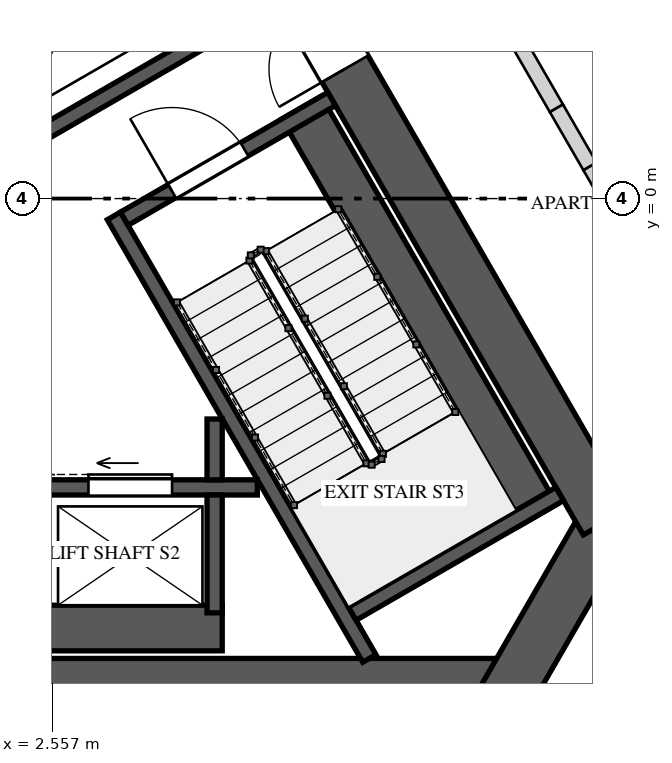
"""IFC4 building model, lengths in metres.
Left out: names, types, materials, properties, quantities, classifications, styles, units other than length and angle.
Written with IfcOpenShell. Run it as: python <this file> out.ifc"""

import sys

from ifc_helpers import new_model, si_unit, direction, frame, frame_2d, origin, place, context, subcontext, project, spatial, rectangle, extrude, element, fill, save


model = new_model("IFC4")
c1 = context("Model", 3, precision=1e-05, world=origin(), true_north=direction((0.0, 1.0)))
c2 = subcontext(c1, "Body", "Model", "MODEL_VIEW")
j1 = project(units=[si_unit("LENGTHUNIT", "METRE"), si_unit("PLANEANGLEUNIT", "RADIAN")], contexts=[c1])
p1 = place(None, origin())
s1 = spatial("IfcSite", under=j1, at=p1, CompositionType="ELEMENT")
p2 = place(p1, origin())
s2 = spatial("IfcBuilding", under=s1, at=p2, CompositionType="ELEMENT")
p3 = place(p2, frame((0.0, 0.0, 245.2)))
s3 = spatial("IfcBuildingStorey", under=s2, at=p3, CompositionType="ELEMENT", Elevation=245.2)
p4 = place(p3, frame((-8.603, -6.4, 0.0), z_axis=(0.0, 0.0, 1.0), x_axis=(1.0, 0.0, 0.0)))
e1 = element("IfcWall", 1, at=p4, inside=s3, PredefinedType="SHEAR", context=c2, shape_type="SweptSolid", body=[
    extrude(rectangle(XDim=17.205, YDim=0.7, at=frame_2d((8.603, 0.0))), origin(), (0.0, 0.0, 1.0), 4.0),
])
p5 = place(p4, frame((6.808, 0.0, 0.0)))
e2 = element("IfcOpeningElement", 2, at=p5, cuts=e1, PredefinedType="OPENING", context=c2, shape_type="SweptSolid", body=[
    extrude(rectangle(XDim=1.0, YDim=2.4, at=frame_2d((0.5, 1.2))), frame((0.0, 0.36, 0.0), z_axis=(0.0, -1.0, 0.0), x_axis=(1.0, 0.0, 0.0)), (0.0, 0.0, 1.0), 0.72),
])
p6 = place(p3, frame((8.501, -6.575, 0.0), z_axis=(0.0, 0.0, 1.0), x_axis=(0.499995765644, 0.866027848477, 0.0)))
e3 = element("IfcWall", 3, at=p6, inside=s3, PredefinedType="SHEAR", context=c2, shape_type="SweptSolid", body=[
    extrude(rectangle(XDim=2.887, YDim=0.7, at=frame_2d((1.443, 0.0))), origin(), (0.0, 0.0, 1.0), 4.0),
])
p7 = place(p3, frame((9.844, -4.25, 0.0), z_axis=(0.0, 0.0, 1.0), x_axis=(-0.500003331888, 0.866023480109, 0.0)))
e4 = element("IfcWall", 4, at=p7, inside=s3, PredefinedType="SHEAR", context=c2, shape_type="SweptSolid", body=[
    extrude(rectangle(XDim=17.205, YDim=0.7, at=frame_2d((8.603, 0.0))), origin(), (0.0, 0.0, 1.0), 4.0),
])
p8 = place(p7, frame((6.877, 0.0, 0.0)))
e5 = element("IfcOpeningElement", 5, at=p8, cuts=e4, PredefinedType="OPENING", context=c2, shape_type="SweptSolid", body=[
    extrude(rectangle(XDim=1.0, YDim=2.4, at=frame_2d((0.5, 1.2))), frame((0.0, 0.36, 0.0), z_axis=(0.0, -1.0, 0.0), x_axis=(1.0, 0.0, 0.0)), (0.0, 0.0, 1.0), 0.72),
])
p9 = place(p3, frame((8.933, -4.172, 0.0), z_axis=(0.0, 0.0, 1.0), x_axis=(-0.500026960575, 0.86600983753, 0.0)))
e6 = element("IfcWall", 6, at=p9, inside=s3, PredefinedType="SOLIDWALL", context=c2, shape_type="SweptSolid", body=[
    extrude(rectangle(XDim=6.2, YDim=0.6, at=frame_2d((3.1, 0.0))), origin(), (0.0, 0.0, 1.0), 3.65),
])
p10 = place(p3, frame((6.726, -6.05, 0.0), z_axis=(0.0, 0.0, 1.0), x_axis=(-0.499970804718, 0.866042259032, 0.0)))
e7 = element("IfcWall", 7, at=p10, inside=s3, PredefinedType="SOLIDWALL", context=c2, shape_type="SweptSolid", body=[
    extrude(rectangle(XDim=6.723, YDim=0.2, at=frame_2d((3.361, 0.0))), origin(), (0.0, 0.0, 1.0), 3.65),
])
p11 = place(p3, frame((6.501, -5.461, 0.0), z_axis=(0.0, 0.0, 1.0), x_axis=(0.866035871367, 0.499981869177, 0.0)))
e8 = element("IfcWall", 8, at=p11, inside=s3, PredefinedType="SOLIDWALL", context=c2, shape_type="SweptSolid", body=[
    extrude(rectangle(XDim=3.15, YDim=0.2, at=frame_2d((1.575, 0.0))), origin(), (0.0, 0.0, 1.0), 3.65),
])
p12 = place(p3, frame((3.501, -0.265, 0.0), z_axis=(0.0, 0.0, 1.0), x_axis=(0.866035871367, 0.499981869177, 0.0)))
e9 = element("IfcWall", 9, at=p12, inside=s3, PredefinedType="SOLIDWALL", context=c2, shape_type="SweptSolid", body=[
    extrude(rectangle(XDim=3.15, YDim=0.2, at=frame_2d((1.575, 0.0))), origin(), (0.0, 0.0, 1.0), 3.65),
])
p13 = place(p12, frame((0.725, 0.0, 0.0)))
e10 = element("IfcOpeningElement", 10, at=p13, cuts=e9, PredefinedType="OPENING", context=c2, shape_type="SweptSolid", body=[
    extrude(rectangle(XDim=1.1, YDim=2.4, at=frame_2d((0.55, 1.2))), frame((0.0, 0.11, 0.0), z_axis=(0.0, -1.0, 0.0), x_axis=(1.0, 0.0, 0.0)), (0.0, 0.0, 1.0), 0.22),
])
p14 = place(p3, frame((-0.71, -3.8, 0.0), z_axis=(0.0, 0.0, 1.0), x_axis=(1.0, 0.0, 0.0)))
e11 = element("IfcWall", 11, at=p14, inside=s3, PredefinedType="SOLIDWALL", context=c2, shape_type="SweptSolid", body=[
    extrude(rectangle(XDim=5.961, YDim=0.2, at=frame_2d((2.981, 0.0))), origin(), (0.0, 0.0, 1.0), 3.65),
])
p15 = place(p14, frame((1.09, 0.0, 0.0)))
e12 = element("IfcOpeningElement", 12, at=p15, cuts=e11, PredefinedType="OPENING", context=c2, shape_type="SweptSolid", body=[
    extrude(rectangle(XDim=1.1, YDim=2.1, at=frame_2d((0.55, 1.05))), frame((0.0, 0.11, 0.0), z_axis=(0.0, -1.0, 0.0), x_axis=(1.0, 0.0, 0.0)), (0.0, 0.0, 1.0), 0.22),
])
p16 = place(p14, frame((3.74, 0.0, 0.0)))
e13 = element("IfcOpeningElement", 13, at=p16, cuts=e11, PredefinedType="OPENING", context=c2, shape_type="SweptSolid", body=[
    extrude(rectangle(XDim=1.1, YDim=2.1, at=frame_2d((0.55, 1.05))), frame((0.0, 0.11, 0.0), z_axis=(0.0, -1.0, 0.0), x_axis=(1.0, 0.0, 0.0)), (0.0, 0.0, 1.0), 0.22),
])
p17 = place(p3, frame((-0.71, -5.65, 0.0), z_axis=(0.0, 0.0, 1.0), x_axis=(1.0, 0.0, 0.0)))
e14 = element("IfcWall", 14, at=p17, inside=s3, PredefinedType="SOLIDWALL", context=c2, shape_type="SweptSolid", body=[
    extrude(rectangle(XDim=5.5, YDim=0.6, at=frame_2d((2.75, 0.0))), origin(), (0.0, 0.0, 1.0), 3.65),
])
p18 = place(p3, frame((4.69, -3.9, 0.0), z_axis=(0.0, 0.0, 1.0), x_axis=(0.0, -1.0, 0.0)))
e15 = element("IfcWall", 15, at=p18, inside=s3, PredefinedType="SOLIDWALL", context=c2, shape_type="SweptSolid", body=[
    extrude(rectangle(XDim=1.55, YDim=0.2, at=frame_2d((0.775, 0.0))), origin(), (0.0, 0.0, 1.0), 3.65),
])
p19 = place(p3, frame((4.69, -2.9, 0.0), z_axis=(0.0, 0.0, 1.0), x_axis=(0.0, -1.0, 0.0)))
e16 = element("IfcWall", 16, at=p19, inside=s3, PredefinedType="SOLIDWALL", context=c2, shape_type="SweptSolid", body=[
    extrude(rectangle(XDim=0.8, YDim=0.2, at=frame_2d((0.4, 0.0))), origin(), (0.0, 0.0, 1.0), 3.65),
])
p20 = place(p3, frame((2.227, 0.743, 0.0), z_axis=(0.0, 0.0, 1.0), x_axis=(0.866022959057, 0.500004234368, 0.0)))
e17 = element("IfcWall", 17, at=p20, inside=s3, PredefinedType="SOLIDWALL", context=c2, shape_type="SweptSolid", body=[
    extrude(rectangle(XDim=3.75, YDim=0.2, at=frame_2d((1.875, 0.0))), origin(), (0.0, 0.0, 1.0), 3.65),
])
p21 = place(p3, frame((8.472, 2.426, 0.0), z_axis=(0.0, 0.0, 1.0), x_axis=(0.499904796234, -0.866080362727, 0.0)))
e18 = element("IfcWall", 18, at=p21, inside=s3, PredefinedType="SOLIDWALL", context=c2, shape_type="SweptSolid", body=[
    extrude(rectangle(XDim=1.429, YDim=0.2, at=frame_2d((0.715, 0.0))), origin(), (0.0, 0.0, 1.0), 3.65),
])
p22 = place(p3, frame((9.187, 1.188, 0.0), z_axis=(0.0, 0.0, 1.0), x_axis=(0.500121072013, -0.86595549154, 0.0)))
e19 = element("IfcWall", 19, at=p22, inside=s3, PredefinedType="SOLIDWALL", context=c2, shape_type="SweptSolid", body=[
    extrude(rectangle(XDim=0.884, YDim=0.2, at=frame_2d((0.442, 0.0))), origin(), (0.0, 0.0, 1.0), 2.75),
])
p23 = place(p3, frame((9.629, 0.423, 0.0), z_axis=(0.0, 0.0, 1.0), x_axis=(0.499995433041, -0.866028040503, 0.0)))
e20 = element("IfcWall", 20, at=p23, inside=s3, PredefinedType="SOLIDWALL", context=c2, shape_type="SweptSolid", body=[
    extrude(rectangle(XDim=5.161, YDim=0.2, at=frame_2d((2.581, 0.0))), origin(), (0.0, 0.0, 1.0), 3.65),
])
p24 = place(p13, origin())
e21 = element("IfcDoor", 21, at=p24, inside=s3, OperationType="SINGLE_SWING_RIGHT", PredefinedType="DOOR", context=c2, shape_type="SweptSolid", body=[
    extrude(rectangle(XDim=1.1, YDim=2.4, at=frame_2d((0.55, 1.2))), frame((0.0, 0.025, 0.0), z_axis=(0.0, -1.0, 0.0), x_axis=(1.0, 0.0, 0.0)), (0.0, 0.0, 1.0), 0.05),
])
fill(e10, e21)
p25 = place(p16, origin())
e22 = element("IfcDoor", 22, at=p25, inside=s3, OperationType="SLIDING_TO_LEFT", PredefinedType="DOOR", context=c2, shape_type="SweptSolid", body=[
    extrude(rectangle(XDim=1.1, YDim=2.1, at=frame_2d((0.55, 1.05))), frame((0.0, 0.025, 0.0), z_axis=(0.0, -1.0, 0.0), x_axis=(1.0, 0.0, 0.0)), (0.0, 0.0, 1.0), 0.05),
])
fill(e13, e22)
p26 = place(p8, origin())
e23 = element("IfcDoor", 23, at=p26, inside=s3, OperationType="SINGLE_SWING_LEFT", PredefinedType="DOOR", context=c2, shape_type="SweptSolid", body=[
    extrude(rectangle(XDim=1.0, YDim=2.4, at=frame_2d((0.5, 1.2))), frame((0.0, 0.025, 0.0), z_axis=(0.0, -1.0, 0.0), x_axis=(1.0, 0.0, 0.0)), (0.0, 0.0, 1.0), 0.05),
])
fill(e5, e23)
save(model, sys.argv[1])
